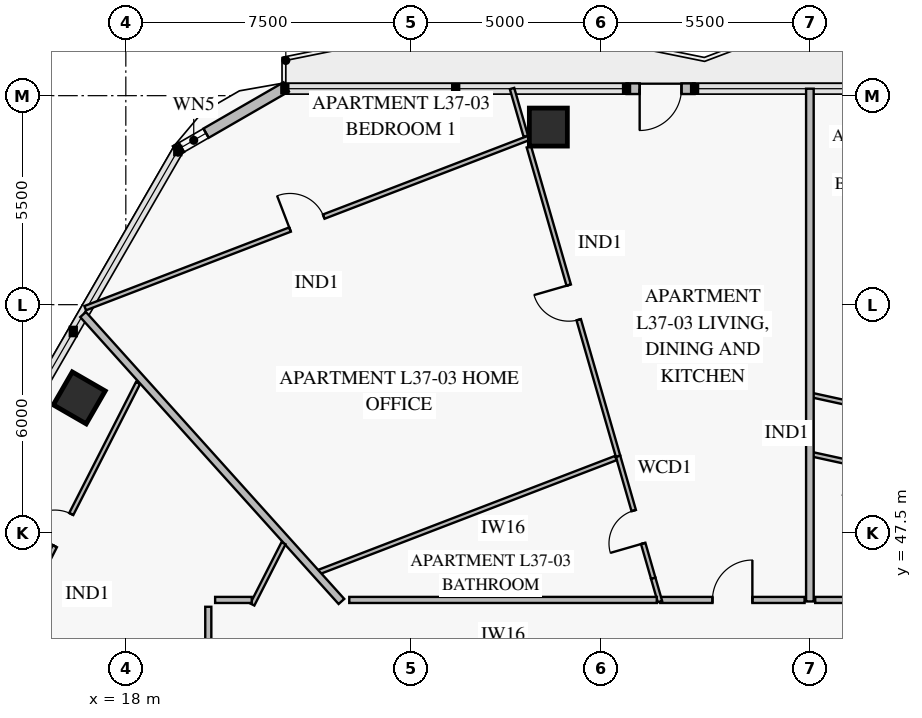
"""IFC4 building model, lengths in metres.
Left out: names, types, materials, properties, quantities, classifications, styles, units other than length and angle.
Written with IfcOpenShell. Run it as: python <this file> out.ifc"""

import sys

from ifc_helpers import new_model, si_unit, direction, frame, frame_2d, origin, origin_2d, place, context, subcontext, project, spatial, rectangle, extrude, element, fill, save


model = new_model("IFC4")
c1 = context("Model", 3, precision=1e-05, world=origin(), true_north=direction((0.0, 1.0)))
c2 = subcontext(c1, "Body", "Model", "MODEL_VIEW")
j1 = project(units=[si_unit("LENGTHUNIT", "METRE"), si_unit("PLANEANGLEUNIT", "RADIAN")], contexts=[c1])
p1 = place(None, origin())
s1 = spatial("IfcSite", under=j1, at=p1, CompositionType="ELEMENT")
p2 = place(p1, origin())
s2 = spatial("IfcBuilding", under=s1, at=p2, CompositionType="ELEMENT")
p3 = place(p2, frame((0.0, 0.0, 150.4)))
s3 = spatial("IfcBuildingStorey", under=s2, at=p3, CompositionType="ELEMENT", Elevation=150.4)
for number, where, z_axis, x_axis in (
    (1, (29.118, 58.173, 0.0), (0.0, 0.0, 1.0), (-1.0, 0.0, 0.0)),
    (2, (16.774, 51.047, 0.0), (0.0, 0.0, 1.0), (-0.5, -0.866, 0.0)),
):
    element("IfcColumn", number, at=place(p3, frame(where, z_axis=z_axis, x_axis=x_axis)), inside=s3, PredefinedType="COLUMN", context=c2, shape_type="SweptSolid", body=[
        extrude(rectangle(XDim=1.0, YDim=1.0, at=origin_2d()), origin(), (0.0, 0.0, 1.0), 3.55),
    ])
p4 = place(p3, frame((19.307, 57.548, 0.0), z_axis=(0.0, 0.0, 1.0), x_axis=(0.866020068361, 0.500009241111, 0.0)))
e3 = element("IfcWall", 3, at=p4, inside=s3, PredefinedType="SOLIDWALL", context=c2, shape_type="SweptSolid", body=[
    extrude(rectangle(XDim=3.365, YDim=0.28, at=frame_2d((1.683, 0.0))), origin(), (0.0, 0.0, 1.0), 3.55),
])
p5 = place(p4, frame((0.179, 0.0, 0.85)))
e4 = element("IfcOpeningElement", 4, at=p5, cuts=e3, PredefinedType="OPENING", context=c2, shape_type="SweptSolid", body=[
    extrude(rectangle(XDim=0.75, YDim=1.5, at=frame_2d((0.375, 0.75))), frame((0.0, 0.152, 0.0), z_axis=(0.0, -1.0, 0.0), x_axis=(1.0, 0.0, 0.0)), (0.0, 0.0, 1.0), 0.304),
])
p6 = place(p3, frame((31.176, 59.183, 0.0), z_axis=(0.0, 0.0, 1.0), x_axis=(1.0, 0.0, 0.0)))
e5 = element("IfcWall", 5, at=p6, inside=s3, PredefinedType="SOLIDWALL", context=c2, shape_type="SweptSolid", body=[
    extrude(rectangle(XDim=1.79, YDim=0.28, at=frame_2d((0.895, 0.0))), origin(), (0.0, 0.0, 1.0), 3.55),
])
p7 = place(p6, frame((0.345, 0.0, 0.0)))
e6 = element("IfcOpeningElement", 6, at=p7, cuts=e5, PredefinedType="OPENING", context=c2, shape_type="SweptSolid", body=[
    extrude(rectangle(XDim=1.1, YDim=2.2, at=frame_2d((0.55, 1.1))), frame((0.0, 0.152, 0.0), z_axis=(0.0, -1.0, 0.0), x_axis=(1.0, 0.0, 0.0)), (0.0, 0.0, 1.0), 0.304),
])
p8 = place(p3, frame((43.285, 47.981, 0.0), z_axis=(0.0, 0.0, 1.0), x_axis=(-0.976898726502, 0.213702779952, 0.0)))
e7 = element("IfcWall", 7, at=p8, inside=s3, PredefinedType="PARTITIONING", context=c2, shape_type="SweptSolid", body=[
    extrude(rectangle(XDim=7.403, YDim=0.12, at=frame_2d((3.701, 0.0))), origin(), (0.0, 0.0, 1.0), 2.9),
])
p9 = place(p8, frame((1.853, 0.0, 0.0)))
e8 = element("IfcOpeningElement", 8, at=p9, cuts=e7, PredefinedType="OPENING", context=c2, shape_type="SweptSolid", body=[
    extrude(rectangle(XDim=0.95, YDim=2.1, at=frame_2d((0.475, 1.05))), frame((0.0, 0.072, 0.0), z_axis=(0.0, -1.0, 0.0), x_axis=(1.0, 0.0, 0.0)), (0.0, 0.0, 1.0), 0.144),
])
p10 = place(p8, frame((5.477, 0.0, 0.0)))
e9 = element("IfcOpeningElement", 9, at=p10, cuts=e7, PredefinedType="OPENING", context=c2, shape_type="SweptSolid", body=[
    extrude(rectangle(XDim=0.9, YDim=2.1, at=frame_2d((0.45, 1.05))), frame((0.0, 0.072, 0.0), z_axis=(0.0, -1.0, 0.0), x_axis=(1.0, 0.0, 0.0)), (0.0, 0.0, 1.0), 0.144),
])
p11 = place(p3, frame((43.921, 49.398, 0.0), z_axis=(0.0, 0.0, 1.0), x_axis=(-0.976896253364, 0.213714085082, 0.0)))
e10 = element("IfcWall", 10, at=p11, inside=s3, PredefinedType="PARTITIONING", context=c2, shape_type="SweptSolid", body=[
    extrude(rectangle(XDim=8.04, YDim=0.12, at=frame_2d((4.02, 0.0))), origin(), (0.0, 0.0, 1.0), 2.9),
])
p12 = place(p11, frame((0.94, 0.0, 0.0)))
e11 = element("IfcOpeningElement", 11, at=p12, cuts=e10, PredefinedType="OPENING", context=c2, shape_type="SweptSolid", body=[
    extrude(rectangle(XDim=0.95, YDim=2.1, at=frame_2d((0.475, 1.05))), frame((0.0, 0.072, 0.0), z_axis=(0.0, -1.0, 0.0), x_axis=(1.0, 0.0, 0.0)), (0.0, 0.0, 1.0), 0.144),
])
p13 = place(p11, frame((3.545, 0.0, 0.0)))
e12 = element("IfcOpeningElement", 12, at=p13, cuts=e10, PredefinedType="OPENING", context=c2, shape_type="SweptSolid", body=[
    extrude(rectangle(XDim=0.95, YDim=2.1, at=frame_2d((0.475, 1.05))), frame((0.0, 0.072, 0.0), z_axis=(0.0, -1.0, 0.0), x_axis=(1.0, 0.0, 0.0)), (0.0, 0.0, 1.0), 0.144),
])
p14 = place(p11, frame((6.15, 0.0, 0.0)))
e13 = element("IfcOpeningElement", 13, at=p14, cuts=e10, PredefinedType="OPENING", context=c2, shape_type="SweptSolid", body=[
    extrude(rectangle(XDim=0.95, YDim=2.1, at=frame_2d((0.475, 1.05))), frame((0.0, 0.072, 0.0), z_axis=(0.0, -1.0, 0.0), x_axis=(1.0, 0.0, 0.0)), (0.0, 0.0, 1.0), 0.144),
])
p15 = place(p3, frame((31.878, 46.3, 0.0), z_axis=(0.0, 0.0, 1.0), x_axis=(-0.276948054291, 0.960884891766, 0.0)))
e14 = element("IfcWall", 14, at=p15, inside=s3, PredefinedType="PARTITIONING", context=c2, shape_type="SweptSolid", body=[
    extrude(rectangle(XDim=3.344, YDim=0.12, at=frame_2d((1.672, 0.0))), origin(), (0.0, 0.0, 1.0), 3.55),
])
p16 = place(p15, frame((0.954, 0.0, 0.0)))
e15 = element("IfcOpeningElement", 15, at=p16, cuts=e14, PredefinedType="OPENING", context=c2, shape_type="SweptSolid", body=[
    extrude(rectangle(XDim=0.9, YDim=2.1, at=frame_2d((0.45, 1.05))), frame((0.0, 0.072, 0.0), z_axis=(0.0, -1.0, 0.0), x_axis=(1.0, 0.0, 0.0)), (0.0, 0.0, 1.0), 0.144),
])
p17 = place(p3, frame((30.952, 49.513, 0.0), z_axis=(0.0, 0.0, 1.0), x_axis=(-0.276962142179, 0.960880831217, 0.0)))
e16 = element("IfcWall", 16, at=p17, inside=s3, PredefinedType="PARTITIONING", context=c2, shape_type="SweptSolid", body=[
    extrude(rectangle(XDim=8.472, YDim=0.12, at=frame_2d((4.236, 0.0))), origin(), (0.0, 0.0, 1.0), 3.55),
])
p18 = place(p17, frame((3.736, 0.0, 0.0)))
e17 = element("IfcOpeningElement", 17, at=p18, cuts=e16, PredefinedType="OPENING", context=c2, shape_type="SweptSolid", body=[
    extrude(rectangle(XDim=0.95, YDim=2.1, at=frame_2d((0.475, 1.05))), frame((0.0, 0.072, 0.0), z_axis=(0.0, -1.0, 0.0), x_axis=(1.0, 0.0, 0.0)), (0.0, 0.0, 1.0), 0.144),
])
p19 = place(p3, frame((28.598, 57.886, 0.0), z_axis=(0.0, 0.0, 1.0), x_axis=(-0.933574508077, -0.358383367177, 0.0)))
e18 = element("IfcWall", 18, at=p19, inside=s3, PredefinedType="PARTITIONING", context=c2, shape_type="SweptSolid", body=[
    extrude(rectangle(XDim=12.497, YDim=0.12, at=frame_2d((6.249, 0.0))), origin(), (0.0, 0.0, 1.0), 2.87),
])
p20 = place(p19, frame((5.773, 0.0, 0.0)))
e19 = element("IfcOpeningElement", 19, at=p20, cuts=e18, PredefinedType="OPENING", context=c2, shape_type="SweptSolid", body=[
    extrude(rectangle(XDim=0.95, YDim=2.1, at=frame_2d((0.475, 1.05))), frame((0.0, 0.072, 0.0), z_axis=(0.0, -1.0, 0.0), x_axis=(1.0, 0.0, 0.0)), (0.0, 0.0, 1.0), 0.144),
])
p21 = place(p3, frame((35.86, 45.73, 0.0), z_axis=(0.0, 0.0, 1.0), x_axis=(-1.0, 0.0, 0.0)))
e20 = element("IfcWall", 20, at=p21, inside=s3, PredefinedType="PARTITIONING", context=c2, shape_type="SweptSolid", body=[
    extrude(rectangle(XDim=3.797, YDim=0.16, at=frame_2d((1.898, 0.0))), origin(), (0.0, 0.0, 1.0), 2.9),
])
p22 = place(p21, frame((1.374, 0.0, 0.0)))
e21 = element("IfcOpeningElement", 21, at=p22, cuts=e20, PredefinedType="OPENING", context=c2, shape_type="SweptSolid", body=[
    extrude(rectangle(XDim=1.05, YDim=2.15, at=frame_2d((0.525, 1.075))), frame((0.0, 0.092, 0.0), z_axis=(0.0, -1.0, 0.0), x_axis=(1.0, 0.0, 0.0)), (0.0, 0.0, 1.0), 0.184),
])
p23 = place(p3, frame((18.322, 51.44, 0.0), z_axis=(0.0, 0.0, 1.0), x_axis=(-0.453994428703, -0.891004522271, 0.0)))
e22 = element("IfcWall", 22, at=p23, inside=s3, PredefinedType="PARTITIONING", context=c2, shape_type="SweptSolid", body=[
    extrude(rectangle(XDim=8.524, YDim=0.12, at=frame_2d((4.262, 0.0))), origin(), (0.0, 0.0, 1.0), 2.9),
])
p24 = place(p23, frame((3.871, 0.0, 0.0)))
e23 = element("IfcOpeningElement", 23, at=p24, cuts=e22, PredefinedType="OPENING", context=c2, shape_type="SweptSolid", body=[
    extrude(rectangle(XDim=0.95, YDim=2.1, at=frame_2d((0.475, 1.05))), frame((0.0, 0.072, 0.0), z_axis=(0.0, -1.0, 0.0), x_axis=(1.0, 0.0, 0.0)), (0.0, 0.0, 1.0), 0.144),
])
p25 = place(p3, frame((36.0, 45.69, 0.0), z_axis=(0.0, 0.0, 1.0), x_axis=(0.0, 1.0, 0.0)))
e24 = element("IfcWall", 24, at=p25, inside=s3, PredefinedType="PARTITIONING", context=c2, shape_type="SweptSolid", body=[
    extrude(rectangle(XDim=13.493, YDim=0.2, at=frame_2d((6.747, 0.0))), origin(), (0.0, 0.0, 1.0), 2.87),
])
p26 = place(p3, frame((32.055, 45.686, 0.0), z_axis=(0.0, 0.0, 1.0), x_axis=(-0.276991075919, 0.960872490948, 0.0)))
e25 = element("IfcWall", 25, at=p26, inside=s3, PredefinedType="PARTITIONING", context=c2, shape_type="SweptSolid", body=[
    extrude(rectangle(XDim=0.639, YDim=0.12, at=frame_2d((0.319, 0.0))), origin(), (0.0, 0.0, 1.0), 3.55),
])
p27 = place(p3, frame((28.525, 57.931, 0.0), z_axis=(0.0, 0.0, 1.0), x_axis=(-0.277038020614, 0.960858956941, 0.0)))
e26 = element("IfcWall", 26, at=p27, inside=s3, PredefinedType="PARTITIONING", context=c2, shape_type="SweptSolid", body=[
    extrude(rectangle(XDim=1.308, YDim=0.12, at=frame_2d((0.654, 0.0))), origin(), (0.0, 0.0, 1.0), 3.55),
])
p28 = place(p3, frame((30.895, 49.465, 0.0), z_axis=(0.0, 0.0, 1.0), x_axis=(-0.933572192245, -0.358389399769, 0.0)))
e27 = element("IfcWall", 27, at=p28, inside=s3, PredefinedType="PARTITIONING", context=c2, shape_type="SweptSolid", body=[
    extrude(rectangle(XDim=8.38, YDim=0.12, at=frame_2d((4.19, 0.0))), origin(), (0.0, 0.0, 1.0), 3.55),
])
p29 = place(p3, frame((23.674, 45.69, 0.0), z_axis=(0.0, 0.0, 1.0), x_axis=(-0.669133315117, 0.743142386492, 0.0)))
e28 = element("IfcWall", 28, at=p29, inside=s3, PredefinedType="PARTITIONING", context=c2, shape_type="SweptSolid", body=[
    extrude(rectangle(XDim=10.16, YDim=0.2, at=frame_2d((5.08, 0.0))), origin(), (0.0, 0.0, 1.0), 2.87),
])
p30 = place(p3, frame((22.149, 47.221, 0.0), z_axis=(0.0, 0.0, 1.0), x_axis=(-0.453952076252, -0.891026100889, 0.0)))
e29 = element("IfcWall", 29, at=p30, inside=s3, PredefinedType="PARTITIONING", context=c2, shape_type="SweptSolid", body=[
    extrude(rectangle(XDim=1.808, YDim=0.12, at=frame_2d((0.904, 0.0))), origin(), (0.0, 0.0, 1.0), 2.9),
])
p31 = place(p3, frame((38.228, 45.73, 0.0), z_axis=(0.0, 0.0, 1.0), x_axis=(-1.0, 0.0, 0.0)))
e30 = element("IfcWall", 30, at=p31, inside=s3, PredefinedType="PARTITIONING", context=c2, shape_type="SweptSolid", body=[
    extrude(rectangle(XDim=2.088, YDim=0.16, at=frame_2d((1.044, 0.0))), origin(), (0.0, 0.0, 1.0), 3.55),
])
p32 = place(p3, frame((31.971, 45.73, 0.0), z_axis=(0.0, 0.0, 1.0), x_axis=(-1.0, 0.0, 0.0)))
e31 = element("IfcWall", 31, at=p32, inside=s3, PredefinedType="PARTITIONING", context=c2, shape_type="SweptSolid", body=[
    extrude(rectangle(XDim=8.092, YDim=0.16, at=frame_2d((4.046, 0.0))), origin(), (0.0, 0.0, 1.0), 3.55),
])
p33 = place(p3, frame((20.17, 45.55, 0.0), z_axis=(0.0, 0.0, 1.0), x_axis=(0.0, -1.0, 0.0)))
e32 = element("IfcWall", 32, at=p33, inside=s3, PredefinedType="PARTITIONING", context=c2, shape_type="SweptSolid", body=[
    extrude(rectangle(XDim=2.064, YDim=0.16, at=frame_2d((1.032, 0.0))), origin(), (0.0, 0.0, 1.0), 3.15),
])
p34 = place(p3, frame((21.313, 45.73, 0.0), z_axis=(0.0, 0.0, 1.0), x_axis=(-1.0, 0.0, 0.0)))
e33 = element("IfcWall", 33, at=p34, inside=s3, PredefinedType="PARTITIONING", context=c2, shape_type="SweptSolid", body=[
    extrude(rectangle(XDim=0.963, YDim=0.16, at=frame_2d((0.481, 0.0))), origin(), (0.0, 0.0, 1.0), 3.15),
])
p35 = place(p5, origin())
e34 = element("IfcWindow", 34, at=p35, inside=s3, PartitioningType="SINGLE_PANEL", PredefinedType="WINDOW", context=c2, shape_type="SweptSolid", body=[
    extrude(rectangle(XDim=0.75, YDim=1.5, at=frame_2d((0.375, 0.75))), frame((0.0, 0.03, 0.0), z_axis=(0.0, -1.0, 0.0), x_axis=(1.0, 0.0, 0.0)), (0.0, 0.0, 1.0), 0.06),
])
fill(e4, e34)
p36 = place(p7, frame((1.1, 0.0, 0.0), z_axis=(0.0, 0.0, 1.0), x_axis=(-1.0, 0.0, 0.0)))
e35 = element("IfcDoor", 35, at=p36, inside=s3, OperationType="SINGLE_SWING_RIGHT", PredefinedType="DOOR", context=c2, shape_type="SweptSolid", body=[
    extrude(rectangle(XDim=1.1, YDim=2.2, at=frame_2d((0.55, 1.1))), frame((0.0, 0.025, 0.0), z_axis=(0.0, -1.0, 0.0), x_axis=(1.0, 0.0, 0.0)), (0.0, 0.0, 1.0), 0.05),
])
fill(e6, e35)
p37 = place(p16, origin())
e36 = element("IfcDoor", 36, at=p37, inside=s3, OperationType="SINGLE_SWING_LEFT", PredefinedType="DOOR", context=c2, shape_type="SweptSolid", body=[
    extrude(rectangle(XDim=0.9, YDim=2.1, at=frame_2d((0.45, 1.05))), frame((0.0, 0.025, 0.0), z_axis=(0.0, -1.0, 0.0), x_axis=(1.0, 0.0, 0.0)), (0.0, 0.0, 1.0), 0.05),
])
fill(e15, e36)
p38 = place(p18, origin())
e37 = element("IfcDoor", 37, at=p38, inside=s3, OperationType="SINGLE_SWING_RIGHT", PredefinedType="DOOR", context=c2, shape_type="SweptSolid", body=[
    extrude(rectangle(XDim=0.95, YDim=2.1, at=frame_2d((0.475, 1.05))), frame((0.0, 0.025, 0.0), z_axis=(0.0, -1.0, 0.0), x_axis=(1.0, 0.0, 0.0)), (0.0, 0.0, 1.0), 0.05),
])
fill(e17, e37)
p39 = place(p20, frame((0.95, 0.0, 0.0), z_axis=(0.0, 0.0, 1.0), x_axis=(-1.0, 0.0, 0.0)))
e38 = element("IfcDoor", 38, at=p39, inside=s3, OperationType="SINGLE_SWING_LEFT", PredefinedType="DOOR", context=c2, shape_type="SweptSolid", body=[
    extrude(rectangle(XDim=0.95, YDim=2.1, at=frame_2d((0.475, 1.05))), frame((0.0, 0.025, 0.0), z_axis=(0.0, -1.0, 0.0), x_axis=(1.0, 0.0, 0.0)), (0.0, 0.0, 1.0), 0.05),
])
fill(e19, e38)
p40 = place(p22, frame((1.05, 0.0, 0.0), z_axis=(0.0, 0.0, 1.0), x_axis=(-1.0, 0.0, 0.0)))
e39 = element("IfcDoor", 39, at=p40, inside=s3, OperationType="SINGLE_SWING_RIGHT", PredefinedType="DOOR", context=c2, shape_type="SweptSolid", body=[
    extrude(rectangle(XDim=1.05, YDim=2.15, at=frame_2d((0.525, 1.075))), frame((0.0, 0.025, 0.0), z_axis=(0.0, -1.0, 0.0), x_axis=(1.0, 0.0, 0.0)), (0.0, 0.0, 1.0), 0.05),
])
fill(e21, e39)
p41 = place(p24, frame((0.95, 0.0, 0.0), z_axis=(0.0, 0.0, 1.0), x_axis=(-1.0, 0.0, 0.0)))
e40 = element("IfcDoor", 40, at=p41, inside=s3, OperationType="SINGLE_SWING_LEFT", PredefinedType="DOOR", context=c2, shape_type="SweptSolid", body=[
    extrude(rectangle(XDim=0.95, YDim=2.1, at=frame_2d((0.475, 1.05))), frame((0.0, 0.025, 0.0), z_axis=(0.0, -1.0, 0.0), x_axis=(1.0, 0.0, 0.0)), (0.0, 0.0, 1.0), 0.05),
])
fill(e23, e40)
save(model, sys.argv[1])
